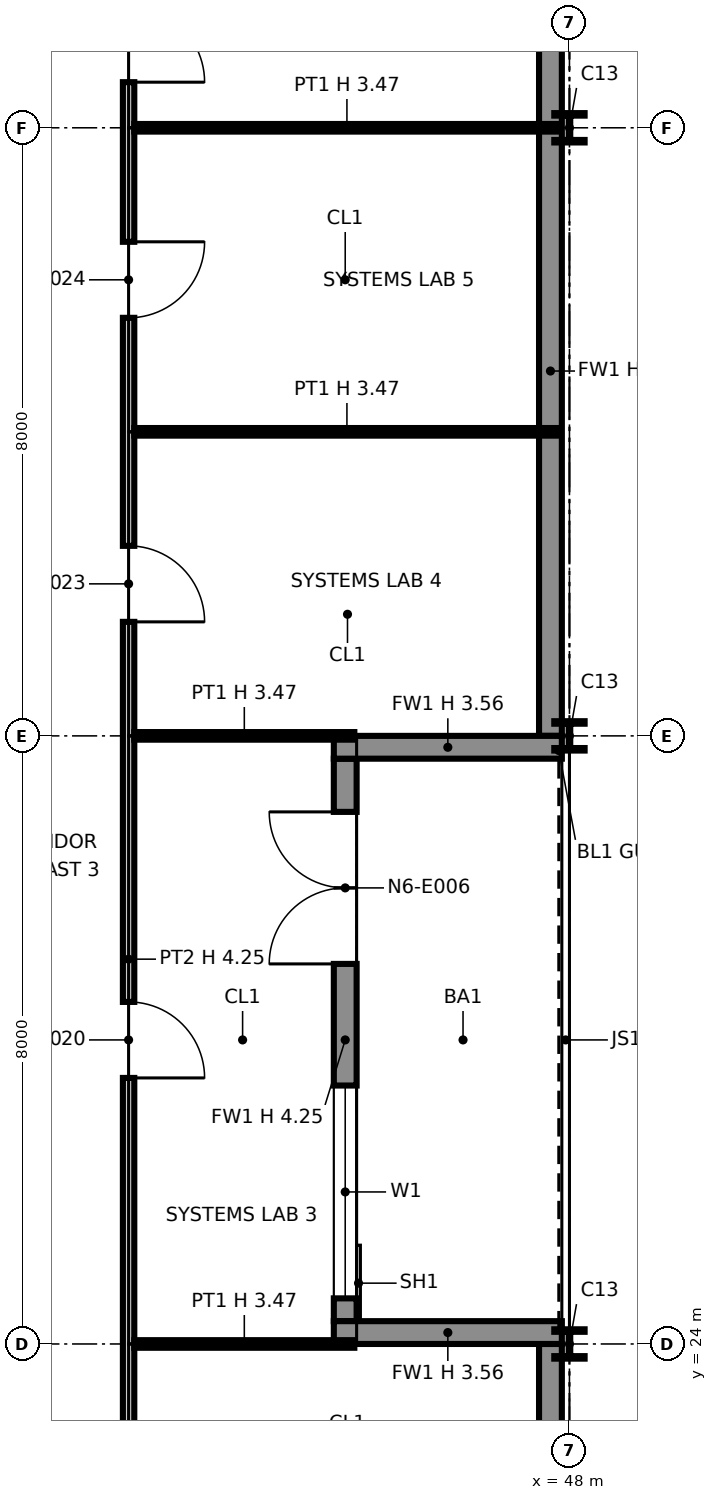
"""IFC4 building model, lengths in metres.
Left out: names, types, materials, properties, quantities, classifications, styles, units other than length and angle.
Written with IfcOpenShell. Run it as: python <this file> out.ifc"""

import sys

from ifc_helpers import new_model, si_unit, direction, frame, frame_2d, origin, origin_2d, place, context, subcontext, project, spatial, polyline, rectangle, i_section, outline, extrude, element, fill, save


model = new_model("IFC4")
c1 = context("Model", 3, precision=1e-05, world=origin(), true_north=direction((0.0, 1.0)))
c2 = subcontext(c1, "Body", "Model", "MODEL_VIEW")
j1 = project(units=[si_unit("LENGTHUNIT", "METRE"), si_unit("PLANEANGLEUNIT", "RADIAN")], contexts=[c1])
p1 = place(None, origin())
s1 = spatial("IfcSite", under=j1, at=p1, CompositionType="ELEMENT")
p2 = place(p1, origin())
s2 = spatial("IfcBuilding", under=s1, at=p2, CompositionType="ELEMENT")
p3 = place(p2, frame((0.0, 0.0, 100.8)))
s3 = spatial("IfcBuildingStorey", under=s2, at=p3, CompositionType="ELEMENT", Elevation=100.8)
for number, where, z_axis, x_axis in (
    (1, (48.0, 24.0, 0.0), (0.0, 0.0, 1.0), (1.0, 0.0, 0.0)),
    (2, (48.0, 32.0, 0.0), (0.0, 0.0, 1.0), (1.0, 0.0, 0.0)),
    (3, (48.0, 40.0, 0.0), (0.0, 0.0, 1.0), (1.0, 0.0, 0.0)),
):
    element("IfcColumn", number, at=place(p3, frame(where, z_axis=z_axis, x_axis=x_axis)), inside=s3, PredefinedType="COLUMN", context=c2, shape_type="SweptSolid", body=[
        extrude(i_section(OverallWidth=0.399, OverallDepth=0.386, WebThickness=0.021, FlangeThickness=0.033, at=origin_2d()), origin(), (0.0, 0.0, 1.0), 4.25),
    ])
p4 = place(p3, frame((47.75, 16.0, 0.0), z_axis=(0.0, 0.0, 1.0), x_axis=(0.0, 1.0, 0.0)))
e4 = element("IfcWall", 4, at=p4, inside=s3, PredefinedType="SOLIDWALL", context=c2, shape_type="SweptSolid", body=[
    extrude(rectangle(XDim=8.0, YDim=0.3, at=frame_2d((4.0, 0.0))), origin(), (0.0, 0.0, 1.0), 4.25),
])
p5 = place(p3, frame((45.05, 24.3, 0.0), z_axis=(0.0, 0.0, 1.0), x_axis=(0.0, 1.0, 0.0)))
e5 = element("IfcWall", 5, at=p5, inside=s3, PredefinedType="SOLIDWALL", context=c2, shape_type="SweptSolid", body=[
    extrude(rectangle(XDim=7.4, YDim=0.3, at=frame_2d((3.7, 0.0))), origin(), (0.0, 0.0, 1.0), 4.25),
])
p6 = place(p5, frame((0.3, 0.0, 0.9)))
e6 = element("IfcOpeningElement", 6, at=p6, cuts=e5, PredefinedType="OPENING", context=c2, shape_type="SweptSolid", body=[
    extrude(rectangle(XDim=2.8, YDim=2.2, at=frame_2d((1.4, 1.1))), frame((0.0, 0.16, 0.0), z_axis=(0.0, -1.0, 0.0), x_axis=(1.0, 0.0, 0.0)), (0.0, 0.0, 1.0), 0.32),
])
p7 = place(p5, frame((4.7, 0.0, 0.0)))
e7 = element("IfcOpeningElement", 7, at=p7, cuts=e5, PredefinedType="OPENING", context=c2, shape_type="SweptSolid", body=[
    extrude(rectangle(XDim=2.0, YDim=2.4, at=frame_2d((1.0, 1.2))), frame((0.0, 0.16, 0.0), z_axis=(0.0, -1.0, 0.0), x_axis=(1.0, 0.0, 0.0)), (0.0, 0.0, 1.0), 0.32),
])
for number, where, z_axis, x_axis in (
    (8, (47.9, 24.15, 0.0), (0.0, 0.0, 1.0), (-1.0, 0.0, 0.0)),
    (9, (47.9, 31.85, 0.0), (0.0, 0.0, 1.0), (-1.0, 0.0, 0.0)),
):
    element("IfcWall", number, at=place(p3, frame(where, z_axis=z_axis, x_axis=x_axis)), inside=s3, PredefinedType="SOLIDWALL", context=c2, shape_type="SweptSolid", body=[
        extrude(rectangle(XDim=3.0, YDim=0.3, at=frame_2d((1.5, 0.0))), origin(), (0.0, 0.0, 1.0), 3.556),
    ])
p8 = place(p3, frame((47.75, 32.0, 0.0), z_axis=(0.0, 0.0, 1.0), x_axis=(0.0, 1.0, 0.0)))
e10 = element("IfcWall", 10, at=p8, inside=s3, PredefinedType="SOLIDWALL", context=c2, shape_type="SweptSolid", body=[
    extrude(rectangle(XDim=9.6, YDim=0.3, at=frame_2d((4.8, 0.0))), origin(), (0.0, 0.0, 1.0), 4.25),
])
p9 = place(p3, frame((42.2, 16.0, 0.0), z_axis=(0.0, 0.0, 1.0), x_axis=(0.0, 1.0, 0.0)))
e11 = element("IfcWall", 11, at=p9, inside=s3, PredefinedType="PARTITIONING", context=c2, shape_type="SweptSolid", body=[
    extrude(outline(polyline([(0.0, 0.0), (26.125, 0.0), (26.125, 4.25), (24.3, 4.25), (24.298, 3.47), (23.702, 3.47), (23.7, 4.25), (20.3, 4.25), (20.298, 3.47), (19.702, 3.47), (19.7, 4.25), (16.3, 4.25), (16.298, 3.47), (15.702, 3.47), (15.7, 4.25), (12.3, 4.25), (12.298, 3.47), (11.702, 3.47), (11.7, 4.25), (8.3, 4.25), (8.298, 3.47), (7.702, 3.47), (7.7, 4.25), (4.3, 4.25), (4.298, 3.47), (3.702, 3.47), (3.7, 4.25), (0.0, 4.25), (0.0, 0.0)])), frame((0.0, 0.075, 0.0), z_axis=(0.0, -1.0, 0.0), x_axis=(1.0, 0.0, 0.0)), (0.0, 0.0, 1.0), 0.15),
])
p10 = place(p9, frame((2.5, 0.0, 0.0), z_axis=(0.0, 0.0, 1.0), x_axis=(-1.0, 0.0, 0.0)))
e12 = element("IfcOpeningElement", 12, at=p10, cuts=e11, PredefinedType="OPENING", context=c2, shape_type="SweptSolid", body=[
    extrude(rectangle(XDim=1.0, YDim=2.1, at=frame_2d((0.5, 1.05))), frame((0.0, 0.085, 0.0), z_axis=(0.0, -1.0, 0.0), x_axis=(1.0, 0.0, 0.0)), (0.0, 0.0, 1.0), 0.17),
])
p11 = place(p9, frame((6.5, 0.0, 0.0), z_axis=(0.0, 0.0, 1.0), x_axis=(-1.0, 0.0, 0.0)))
e13 = element("IfcOpeningElement", 13, at=p11, cuts=e11, PredefinedType="OPENING", context=c2, shape_type="SweptSolid", body=[
    extrude(rectangle(XDim=1.0, YDim=2.1, at=frame_2d((0.5, 1.05))), frame((0.0, 0.085, 0.0), z_axis=(0.0, -1.0, 0.0), x_axis=(1.0, 0.0, 0.0)), (0.0, 0.0, 1.0), 0.17),
])
p12 = place(p9, frame((12.5, 0.0, 0.0), z_axis=(0.0, 0.0, 1.0), x_axis=(-1.0, 0.0, 0.0)))
e14 = element("IfcOpeningElement", 14, at=p12, cuts=e11, PredefinedType="OPENING", context=c2, shape_type="SweptSolid", body=[
    extrude(rectangle(XDim=1.0, YDim=2.1, at=frame_2d((0.5, 1.05))), frame((0.0, 0.085, 0.0), z_axis=(0.0, -1.0, 0.0), x_axis=(1.0, 0.0, 0.0)), (0.0, 0.0, 1.0), 0.17),
])
p13 = place(p9, frame((18.5, 0.0, 0.0), z_axis=(0.0, 0.0, 1.0), x_axis=(-1.0, 0.0, 0.0)))
e15 = element("IfcOpeningElement", 15, at=p13, cuts=e11, PredefinedType="OPENING", context=c2, shape_type="SweptSolid", body=[
    extrude(rectangle(XDim=1.0, YDim=2.1, at=frame_2d((0.5, 1.05))), frame((0.0, 0.085, 0.0), z_axis=(0.0, -1.0, 0.0), x_axis=(1.0, 0.0, 0.0)), (0.0, 0.0, 1.0), 0.17),
])
p14 = place(p9, frame((22.5, 0.0, 0.0), z_axis=(0.0, 0.0, 1.0), x_axis=(-1.0, 0.0, 0.0)))
e16 = element("IfcOpeningElement", 16, at=p14, cuts=e11, PredefinedType="OPENING", context=c2, shape_type="SweptSolid", body=[
    extrude(rectangle(XDim=1.0, YDim=2.1, at=frame_2d((0.5, 1.05))), frame((0.0, 0.085, 0.0), z_axis=(0.0, -1.0, 0.0), x_axis=(1.0, 0.0, 0.0)), (0.0, 0.0, 1.0), 0.17),
])
p15 = place(p9, frame((25.6, 0.0, 0.0), z_axis=(0.0, 0.0, 1.0), x_axis=(-1.0, 0.0, 0.0)))
e17 = element("IfcOpeningElement", 17, at=p15, cuts=e11, PredefinedType="OPENING", context=c2, shape_type="SweptSolid", body=[
    extrude(rectangle(XDim=1.0, YDim=2.1, at=frame_2d((0.5, 1.05))), frame((0.0, 0.085, 0.0), z_axis=(0.0, -1.0, 0.0), x_axis=(1.0, 0.0, 0.0)), (0.0, 0.0, 1.0), 0.17),
])
for number, where, z_axis, x_axis in (
    (18, (42.275, 24.0, 0.0), (0.0, 0.0, 1.0), (1.0, 0.0, 0.0)),
    (19, (42.275, 32.0, 0.0), (0.0, 0.0, 1.0), (1.0, 0.0, 0.0)),
):
    element("IfcWall", number, at=place(p3, frame(where, z_axis=z_axis, x_axis=x_axis)), inside=s3, PredefinedType="PARTITIONING", context=c2, shape_type="SweptSolid", body=[
        extrude(rectangle(XDim=2.895, YDim=0.1, at=frame_2d((1.448, 0.0))), origin(), (0.0, 0.0, 1.0), 3.47),
    ])
for number, where, z_axis, x_axis in (
    (20, (42.275, 36.0, 0.0), (0.0, 0.0, 1.0), (1.0, 0.0, 0.0)),
    (21, (42.275, 40.0, 0.0), (0.0, 0.0, 1.0), (1.0, 0.0, 0.0)),
):
    element("IfcWall", number, at=place(p3, frame(where, z_axis=z_axis, x_axis=x_axis)), inside=s3, PredefinedType="PARTITIONING", context=c2, shape_type="SweptSolid", body=[
        extrude(rectangle(XDim=5.595, YDim=0.1, at=frame_2d((2.798, 0.0))), origin(), (0.0, 0.0, 1.0), 3.47),
    ])
p16 = place(p6, origin())
e22 = element("IfcWindow", 22, at=p16, inside=s3, PartitioningType="SINGLE_PANEL", PredefinedType="WINDOW", context=c2, shape_type="SweptSolid", body=[
    extrude(rectangle(XDim=2.8, YDim=2.2, at=frame_2d((1.4, 1.1))), frame((0.0, 0.03, 0.0), z_axis=(0.0, -1.0, 0.0), x_axis=(1.0, 0.0, 0.0)), (0.0, 0.0, 1.0), 0.06),
])
fill(e6, e22)
p17 = place(p7, origin())
e23 = element("IfcDoor", 23, at=p17, inside=s3, OperationType="DOUBLE_DOOR_SINGLE_SWING", PredefinedType="DOOR", context=c2, shape_type="SweptSolid", body=[
    extrude(rectangle(XDim=2.0, YDim=2.4, at=frame_2d((1.0, 1.2))), frame((0.0, 0.025, 0.0), z_axis=(0.0, -1.0, 0.0), x_axis=(1.0, 0.0, 0.0)), (0.0, 0.0, 1.0), 0.05),
])
fill(e7, e23)
p18 = place(p12, origin())
e24 = element("IfcDoor", 24, at=p18, inside=s3, OperationType="SINGLE_SWING_RIGHT", PredefinedType="DOOR", context=c2, shape_type="SweptSolid", body=[
    extrude(rectangle(XDim=1.0, YDim=2.1, at=frame_2d((0.5, 1.05))), frame((0.0, 0.025, 0.0), z_axis=(0.0, -1.0, 0.0), x_axis=(1.0, 0.0, 0.0)), (0.0, 0.0, 1.0), 0.05),
])
fill(e14, e24)
p19 = place(p13, origin())
e25 = element("IfcDoor", 25, at=p19, inside=s3, OperationType="SINGLE_SWING_RIGHT", PredefinedType="DOOR", context=c2, shape_type="SweptSolid", body=[
    extrude(rectangle(XDim=1.0, YDim=2.1, at=frame_2d((0.5, 1.05))), frame((0.0, 0.025, 0.0), z_axis=(0.0, -1.0, 0.0), x_axis=(1.0, 0.0, 0.0)), (0.0, 0.0, 1.0), 0.05),
])
fill(e15, e25)
p20 = place(p14, origin())
e26 = element("IfcDoor", 26, at=p20, inside=s3, OperationType="SINGLE_SWING_LEFT", PredefinedType="DOOR", context=c2, shape_type="SweptSolid", body=[
    extrude(rectangle(XDim=1.0, YDim=2.1, at=frame_2d((0.5, 1.05))), frame((0.0, 0.025, 0.0), z_axis=(0.0, -1.0, 0.0), x_axis=(1.0, 0.0, 0.0)), (0.0, 0.0, 1.0), 0.05),
])
fill(e16, e26)
p21 = place(p15, origin())
e27 = element("IfcDoor", 27, at=p21, inside=s3, OperationType="SINGLE_SWING_RIGHT", PredefinedType="DOOR", context=c2, shape_type="SweptSolid", body=[
    extrude(rectangle(XDim=1.0, YDim=2.1, at=frame_2d((0.5, 1.05))), frame((0.0, 0.025, 0.0), z_axis=(0.0, -1.0, 0.0), x_axis=(1.0, 0.0, 0.0)), (0.0, 0.0, 1.0), 0.05),
])
fill(e17, e27)
save(model, sys.argv[1])
